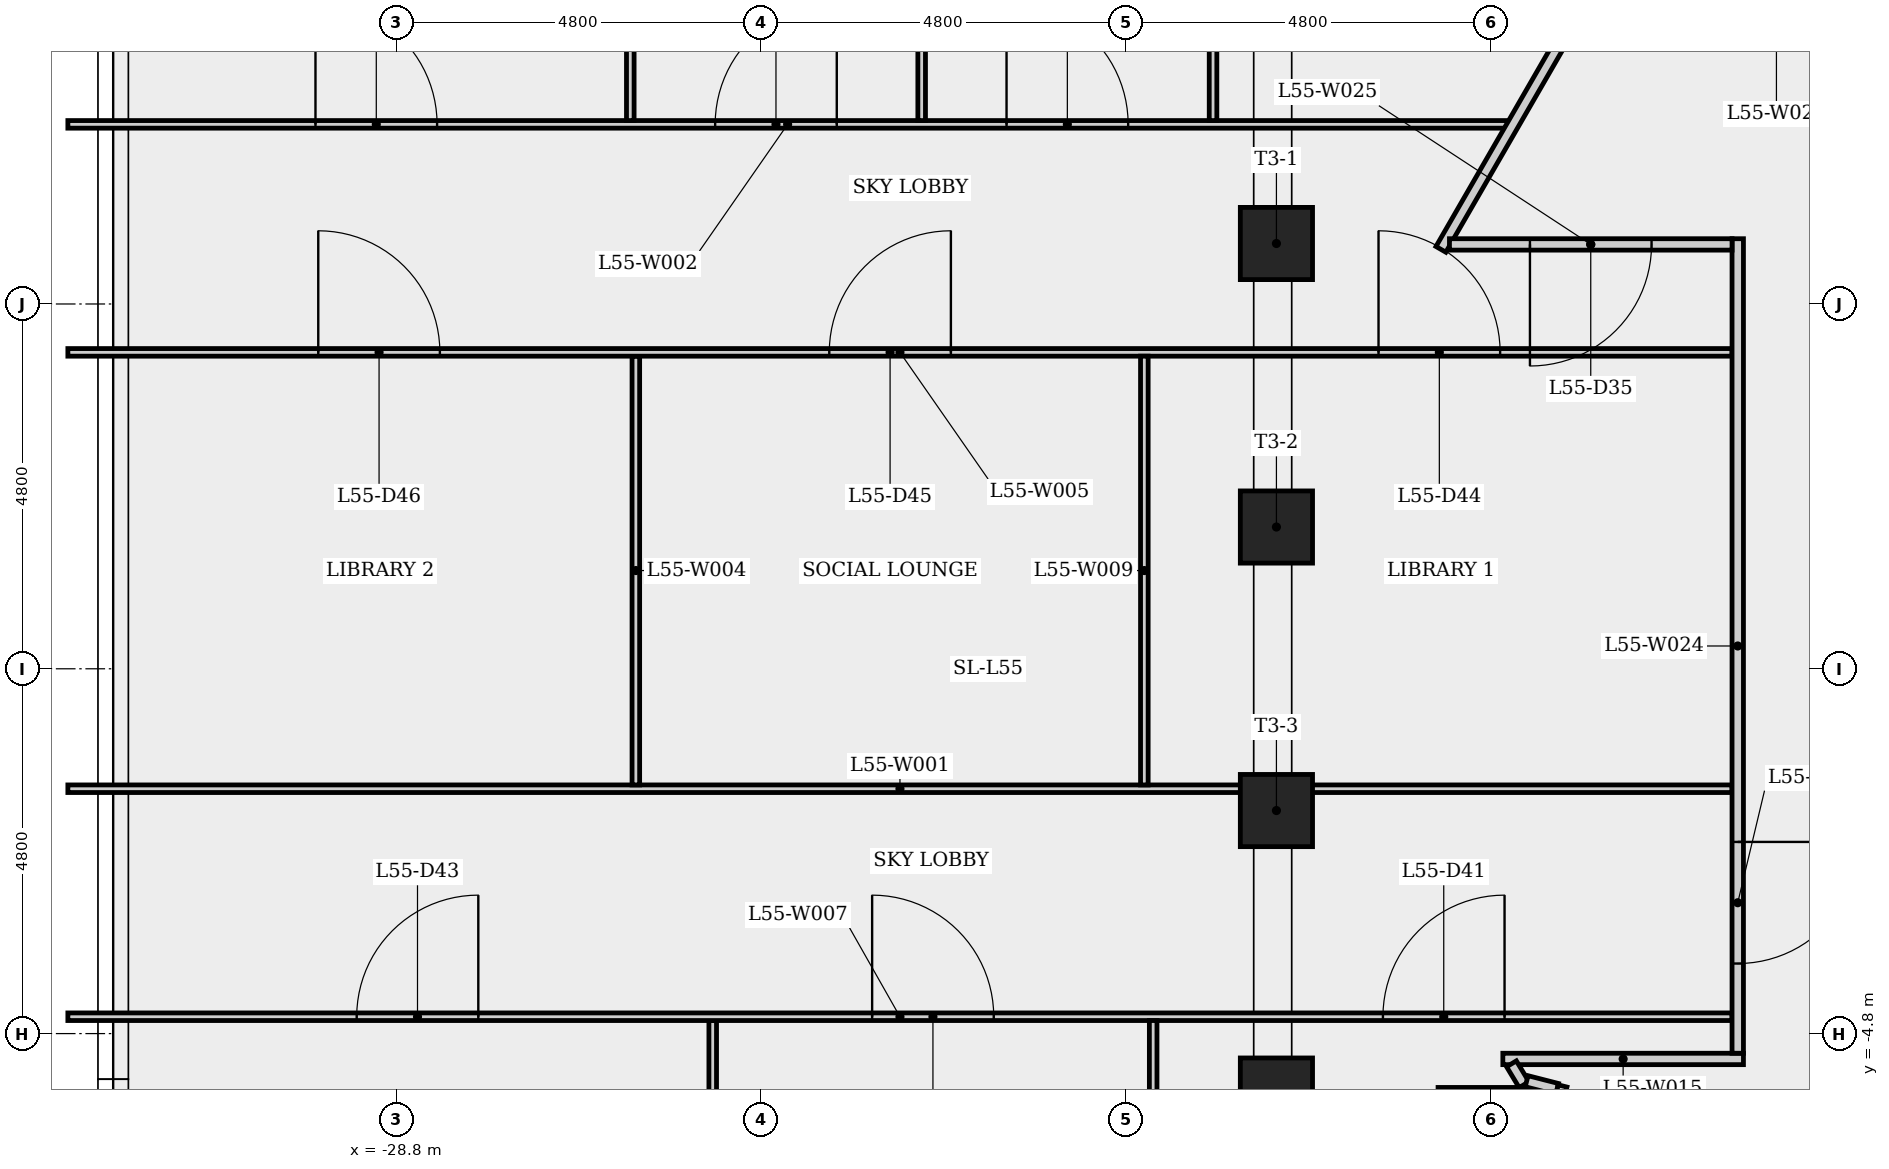
"""IFC4 building model, lengths in metres.
Left out: names, types, materials, properties, quantities, classifications, styles, units other than length and angle.
Written with IfcOpenShell. Run it as: python <this file> out.ifc"""

import sys

from ifc_helpers import new_model, si_unit, direction, frame, frame_2d, origin, origin_2d, place, context, subcontext, project, spatial, rectangle, extrude, element, fill, save


model = new_model("IFC4")
c1 = context("Model", 3, precision=1e-05, world=origin(), true_north=direction((0.0, 1.0)))
c2 = subcontext(c1, "Body", "Model", "MODEL_VIEW")
j1 = project(units=[si_unit("LENGTHUNIT", "METRE"), si_unit("PLANEANGLEUNIT", "RADIAN")], contexts=[c1])
p1 = place(None, origin())
s1 = spatial("IfcSite", under=j1, at=p1, CompositionType="ELEMENT")
p2 = place(p1, origin())
s2 = spatial("IfcBuilding", under=s1, at=p2, CompositionType="ELEMENT")
p3 = place(p2, frame((0.0, 0.0, 206.1)))
s3 = spatial("IfcBuildingStorey", under=s2, at=p3, CompositionType="ELEMENT", Elevation=206.1)
for number, where, z_axis, x_axis in (
    (1, (-17.219, 5.596, 0.0), (0.0, 0.0, 1.0), (-1.0, 0.0, 0.0)),
    (2, (-17.219, 1.865, 0.0), (0.0, 0.0, 1.0), (-1.0, 0.0, 0.0)),
    (3, (-17.219, -1.865, 0.0), (0.0, 0.0, 1.0), (-1.0, 0.0, 0.0)),
    (4, (-17.219, -5.596, 0.0), (0.0, 0.0, 1.0), (-1.0, 0.0, 0.0)),
):
    element("IfcColumn", number, at=place(p3, frame(where, z_axis=z_axis, x_axis=x_axis)), inside=s3, PredefinedType="COLUMN", context=c2, shape_type="SweptSolid", body=[
        extrude(rectangle(XDim=0.95, YDim=0.95, at=origin_2d()), origin(), (0.0, 0.0, 1.0), 4.0),
    ])
p4 = place(p3, frame((-33.12, -1.578, 0.0), z_axis=(0.0, 0.0, 1.0), x_axis=(1.0, 0.0, 0.0)))
e5 = element("IfcWall", 5, at=p4, inside=s3, PredefinedType="PARTITIONING", context=c2, shape_type="SweptSolid", body=[
    extrude(rectangle(XDim=21.895, YDim=0.1, at=frame_2d((10.948, 0.0))), origin(), (0.0, 0.0, 1.0), 3.6),
])
p5 = place(p3, frame((-33.12, 7.163, 0.0), z_axis=(0.0, 0.0, 1.0), x_axis=(1.0, 0.0, 0.0)))
e6 = element("IfcWall", 6, at=p5, inside=s3, PredefinedType="PARTITIONING", context=c2, shape_type="SweptSolid", body=[
    extrude(rectangle(XDim=18.939, YDim=0.1, at=frame_2d((9.47, 0.0))), origin(), (0.0, 0.0, 1.0), 3.6),
])
p6 = place(p5, frame((12.35, 0.0, 0.0)))
e7 = element("IfcOpeningElement", 7, at=p6, cuts=e6, PredefinedType="OPENING", context=c2, shape_type="SweptSolid", body=[
    extrude(rectangle(XDim=1.6, YDim=2.1, at=frame_2d((0.8, 1.05))), frame((0.0, 0.06, 0.0), z_axis=(0.0, -1.0, 0.0), x_axis=(1.0, 0.0, 0.0)), (0.0, 0.0, 1.0), 0.12),
])
p7 = place(p5, frame((8.516, 0.0, 0.0)))
e8 = element("IfcOpeningElement", 8, at=p7, cuts=e6, PredefinedType="OPENING", context=c2, shape_type="SweptSolid", body=[
    extrude(rectangle(XDim=1.6, YDim=2.1, at=frame_2d((0.8, 1.05))), frame((0.0, 0.06, 0.0), z_axis=(0.0, -1.0, 0.0), x_axis=(1.0, 0.0, 0.0)), (0.0, 0.0, 1.0), 0.12),
])
p8 = place(p5, frame((3.258, 0.0, 0.0)))
e9 = element("IfcOpeningElement", 9, at=p8, cuts=e6, PredefinedType="OPENING", context=c2, shape_type="SweptSolid", body=[
    extrude(rectangle(XDim=1.6, YDim=2.1, at=frame_2d((0.8, 1.05))), frame((0.0, 0.06, 0.0), z_axis=(0.0, -1.0, 0.0), x_axis=(1.0, 0.0, 0.0)), (0.0, 0.0, 1.0), 0.12),
])
p9 = place(p3, frame((-25.721, 7.213, 0.0), z_axis=(0.0, 0.0, 1.0), x_axis=(0.0, 1.0, 0.0)))
e10 = element("IfcWall", 10, at=p9, inside=s3, PredefinedType="PARTITIONING", context=c2, shape_type="SweptSolid", body=[
    extrude(rectangle(XDim=14.483, YDim=0.1, at=frame_2d((7.241, 0.0))), origin(), (0.0, 0.0, 1.0), 3.6),
])
p10 = place(p3, frame((-25.647, -1.528, 0.0), z_axis=(0.0, 0.0, 1.0), x_axis=(0.0, 1.0, 0.0)))
e11 = element("IfcWall", 11, at=p10, inside=s3, PredefinedType="PARTITIONING", context=c2, shape_type="SweptSolid", body=[
    extrude(rectangle(XDim=5.642, YDim=0.1, at=frame_2d((2.821, 0.0))), origin(), (0.0, 0.0, 1.0), 3.6),
])
p11 = place(p3, frame((-33.12, 4.163, 0.0), z_axis=(0.0, 0.0, 1.0), x_axis=(1.0, 0.0, 0.0)))
e12 = element("IfcWall", 12, at=p11, inside=s3, PredefinedType="PARTITIONING", context=c2, shape_type="SweptSolid", body=[
    extrude(rectangle(XDim=21.895, YDim=0.1, at=frame_2d((10.948, 0.0))), origin(), (0.0, 0.0, 1.0), 3.6),
])
p12 = place(p11, frame((17.244, 0.0, 0.0)))
e13 = element("IfcOpeningElement", 13, at=p12, cuts=e12, PredefinedType="OPENING", context=c2, shape_type="SweptSolid", body=[
    extrude(rectangle(XDim=1.6, YDim=2.1, at=frame_2d((0.8, 1.05))), frame((0.0, 0.06, 0.0), z_axis=(0.0, -1.0, 0.0), x_axis=(1.0, 0.0, 0.0)), (0.0, 0.0, 1.0), 0.12),
])
p13 = place(p11, frame((10.018, 0.0, 0.0)))
e14 = element("IfcOpeningElement", 14, at=p13, cuts=e12, PredefinedType="OPENING", context=c2, shape_type="SweptSolid", body=[
    extrude(rectangle(XDim=1.6, YDim=2.1, at=frame_2d((0.8, 1.05))), frame((0.0, 0.06, 0.0), z_axis=(0.0, -1.0, 0.0), x_axis=(1.0, 0.0, 0.0)), (0.0, 0.0, 1.0), 0.12),
])
p14 = place(p11, frame((3.294, 0.0, 0.0)))
e15 = element("IfcOpeningElement", 15, at=p14, cuts=e12, PredefinedType="OPENING", context=c2, shape_type="SweptSolid", body=[
    extrude(rectangle(XDim=1.6, YDim=2.1, at=frame_2d((0.8, 1.05))), frame((0.0, 0.06, 0.0), z_axis=(0.0, -1.0, 0.0), x_axis=(1.0, 0.0, 0.0)), (0.0, 0.0, 1.0), 0.12),
])
p15 = place(p3, frame((-24.636, -17.496, 0.0), z_axis=(0.0, 0.0, 1.0), x_axis=(0.0, 1.0, 0.0)))
e16 = element("IfcWall", 16, at=p15, inside=s3, PredefinedType="PARTITIONING", context=c2, shape_type="SweptSolid", body=[
    extrude(rectangle(XDim=12.868, YDim=0.1, at=frame_2d((6.434, 0.0))), origin(), (0.0, 0.0, 1.0), 3.6),
])
p16 = place(p3, frame((-33.12, -4.578, 0.0), z_axis=(0.0, 0.0, 1.0), x_axis=(1.0, 0.0, 0.0)))
e17 = element("IfcWall", 17, at=p16, inside=s3, PredefinedType="PARTITIONING", context=c2, shape_type="SweptSolid", body=[
    extrude(rectangle(XDim=21.895, YDim=0.1, at=frame_2d((10.948, 0.0))), origin(), (0.0, 0.0, 1.0), 3.6),
])
p17 = place(p16, frame((17.302, 0.0, 0.0)))
e18 = element("IfcOpeningElement", 18, at=p17, cuts=e17, PredefinedType="OPENING", context=c2, shape_type="SweptSolid", body=[
    extrude(rectangle(XDim=1.6, YDim=2.1, at=frame_2d((0.8, 1.05))), frame((0.0, 0.06, 0.0), z_axis=(0.0, -1.0, 0.0), x_axis=(1.0, 0.0, 0.0)), (0.0, 0.0, 1.0), 0.12),
])
p18 = place(p16, frame((10.582, 0.0, 0.0)))
e19 = element("IfcOpeningElement", 19, at=p18, cuts=e17, PredefinedType="OPENING", context=c2, shape_type="SweptSolid", body=[
    extrude(rectangle(XDim=1.6, YDim=2.1, at=frame_2d((0.8, 1.05))), frame((0.0, 0.06, 0.0), z_axis=(0.0, -1.0, 0.0), x_axis=(1.0, 0.0, 0.0)), (0.0, 0.0, 1.0), 0.12),
])
p19 = place(p16, frame((3.8, 0.0, 0.0)))
e20 = element("IfcOpeningElement", 20, at=p19, cuts=e17, PredefinedType="OPENING", context=c2, shape_type="SweptSolid", body=[
    extrude(rectangle(XDim=1.6, YDim=2.1, at=frame_2d((0.8, 1.05))), frame((0.0, 0.06, 0.0), z_axis=(0.0, -1.0, 0.0), x_axis=(1.0, 0.0, 0.0)), (0.0, 0.0, 1.0), 0.12),
])
p20 = place(p3, frame((-21.887, 7.213, 0.0), z_axis=(0.0, 0.0, 1.0), x_axis=(0.0, 1.0, 0.0)))
e21 = element("IfcWall", 21, at=p20, inside=s3, PredefinedType="PARTITIONING", context=c2, shape_type="SweptSolid", body=[
    extrude(rectangle(XDim=14.483, YDim=0.1, at=frame_2d((7.241, 0.0))), origin(), (0.0, 0.0, 1.0), 3.6),
])
p21 = place(p3, frame((-18.957, -1.528, 0.0), z_axis=(0.0, 0.0, 1.0), x_axis=(0.0, 1.0, 0.0)))
e22 = element("IfcWall", 22, at=p21, inside=s3, PredefinedType="PARTITIONING", context=c2, shape_type="SweptSolid", body=[
    extrude(rectangle(XDim=5.642, YDim=0.1, at=frame_2d((2.821, 0.0))), origin(), (0.0, 0.0, 1.0), 3.6),
])
p22 = place(p3, frame((-18.841, -17.496, 0.0), z_axis=(0.0, 0.0, 1.0), x_axis=(0.0, 1.0, 0.0)))
e23 = element("IfcWall", 23, at=p22, inside=s3, PredefinedType="PARTITIONING", context=c2, shape_type="SweptSolid", body=[
    extrude(rectangle(XDim=12.868, YDim=0.1, at=frame_2d((6.434, 0.0))), origin(), (0.0, 0.0, 1.0), 3.6),
])
p23 = place(p3, frame((-18.053, 7.213, 0.0), z_axis=(0.0, 0.0, 1.0), x_axis=(0.0, 1.0, 0.0)))
e24 = element("IfcWall", 24, at=p23, inside=s3, PredefinedType="PARTITIONING", context=c2, shape_type="SweptSolid", body=[
    extrude(rectangle(XDim=14.483, YDim=0.1, at=frame_2d((7.241, 0.0))), origin(), (0.0, 0.0, 1.0), 3.6),
])
p24 = place(p3, frame((-15.055, 5.519, 0.0), z_axis=(0.0, 0.0, 1.0), x_axis=(0.499997192861, 0.866027024481, 0.0)))
e25 = element("IfcWall", 25, at=p24, inside=s3, PredefinedType="PARTITIONING", context=c2, shape_type="SweptSolid", body=[
    extrude(rectangle(XDim=6.615, YDim=0.15, at=frame_2d((3.308, 0.0))), origin(), (0.0, 0.0, 1.0), 3.6),
])
p25 = place(p24, frame((3.417, 0.0, 0.0)))
e26 = element("IfcOpeningElement", 26, at=p25, cuts=e25, PredefinedType="OPENING", context=c2, shape_type="SweptSolid", body=[
    extrude(rectangle(XDim=1.6, YDim=2.1, at=frame_2d((0.8, 1.05))), frame((0.0, 0.085, 0.0), z_axis=(0.0, -1.0, 0.0), x_axis=(1.0, 0.0, 0.0)), (0.0, 0.0, 1.0), 0.17),
])
p26 = place(p3, frame((-15.093, -5.584, 0.0), z_axis=(0.0, 0.0, 1.0), x_axis=(1.0, 0.0, 0.0)))
e27 = element("IfcWall", 27, at=p26, inside=s3, PredefinedType="PARTITIONING", context=c2, shape_type="SweptSolid", body=[
    extrude(rectangle(XDim=1.556, YDim=0.15, at=frame_2d((0.778, 0.0))), origin(), (0.0, 0.0, 1.0), 3.6),
])
p27 = place(p3, frame((-14.24, -5.134, 0.0), z_axis=(0.0, 0.0, 1.0), x_axis=(1.0, 0.0, 0.0)))
e28 = element("IfcWall", 28, at=p27, inside=s3, PredefinedType="PARTITIONING", context=c2, shape_type="SweptSolid", body=[
    extrude(rectangle(XDim=3.166, YDim=0.15, at=frame_2d((1.583, 0.0))), origin(), (0.0, 0.0, 1.0), 3.6),
])
p28 = place(p3, frame((-13.961, -5.472, 0.0), z_axis=(0.0, 0.0, 1.0), x_axis=(-0.51651090313, 0.856280612269, 0.0)))
e29 = element("IfcWall", 29, at=p28, inside=s3, PredefinedType="PARTITIONING", context=c2, shape_type="SweptSolid", body=[
    extrude(rectangle(XDim=0.321, YDim=0.15, at=frame_2d((0.16, 0.0))), origin(), (0.0, 0.0, 1.0), 3.6),
])
p29 = place(p3, frame((-13.527, -5.529, 0.0), z_axis=(0.0, 0.0, 1.0), x_axis=(-0.968736704431, 0.248091107232, 0.0)))
e30 = element("IfcWall", 30, at=p29, inside=s3, PredefinedType="PARTITIONING", context=c2, shape_type="SweptSolid", body=[
    extrude(rectangle(XDim=0.413, YDim=0.15, at=frame_2d((0.207, 0.0))), origin(), (0.0, 0.0, 1.0), 3.6),
])
p30 = place(p3, frame((-13.416, -5.576, 0.0), z_axis=(0.0, 0.0, 1.0), x_axis=(-0.968907106081, 0.247424776016, 0.0)))
e31 = element("IfcWall", 31, at=p30, inside=s3, PredefinedType="PARTITIONING", context=c2, shape_type="SweptSolid", body=[
    extrude(rectangle(XDim=0.117, YDim=0.15, at=frame_2d((0.059, 0.0))), origin(), (0.0, 0.0, 1.0), 3.6),
])
p31 = place(p3, frame((-11.748, 11.118, 0.0), z_axis=(0.0, 0.0, 1.0), x_axis=(0.499988172549, -0.866032232259, 0.0)))
e32 = element("IfcWall", 32, at=p31, inside=s3, PredefinedType="PARTITIONING", context=c2, shape_type="SweptSolid", body=[
    extrude(rectangle(XDim=4.427, YDim=0.15, at=frame_2d((2.214, 0.0))), origin(), (0.0, 0.0, 1.0), 3.6),
])
p32 = place(p31, frame((1.676, 0.0, 0.0)))
e33 = element("IfcOpeningElement", 33, at=p32, cuts=e32, PredefinedType="OPENING", context=c2, shape_type="SweptSolid", body=[
    extrude(rectangle(XDim=1.0, YDim=2.1, at=frame_2d((0.5, 1.05))), frame((0.0, 0.085, 0.0), z_axis=(0.0, -1.0, 0.0), x_axis=(1.0, 0.0, 0.0)), (0.0, 0.0, 1.0), 0.17),
])
p33 = place(p3, frame((-11.15, 5.659, 0.0), z_axis=(0.0, 0.0, 1.0), x_axis=(0.0, -1.0, 0.0)))
e34 = element("IfcWall", 34, at=p33, inside=s3, PredefinedType="PARTITIONING", context=c2, shape_type="SweptSolid", body=[
    extrude(rectangle(XDim=10.717, YDim=0.15, at=frame_2d((5.359, 0.0))), origin(), (0.0, 0.0, 1.0), 3.6),
])
p34 = place(p33, frame((7.937, 0.0, 0.0)))
e35 = element("IfcOpeningElement", 35, at=p34, cuts=e34, PredefinedType="OPENING", context=c2, shape_type="SweptSolid", body=[
    extrude(rectangle(XDim=1.6, YDim=2.1, at=frame_2d((0.8, 1.05))), frame((0.0, 0.085, 0.0), z_axis=(0.0, -1.0, 0.0), x_axis=(1.0, 0.0, 0.0)), (0.0, 0.0, 1.0), 0.17),
])
p35 = place(p3, frame((-11.225, 5.584, 0.0), z_axis=(0.0, 0.0, 1.0), x_axis=(-1.0, 0.0, 0.0)))
e36 = element("IfcWall", 36, at=p35, inside=s3, PredefinedType="PARTITIONING", context=c2, shape_type="SweptSolid", body=[
    extrude(rectangle(XDim=3.718, YDim=0.15, at=frame_2d((1.859, 0.0))), origin(), (0.0, 0.0, 1.0), 3.6),
])
p36 = place(p35, frame((1.059, 0.0, 0.0)))
e37 = element("IfcOpeningElement", 37, at=p36, cuts=e36, PredefinedType="OPENING", context=c2, shape_type="SweptSolid", body=[
    extrude(rectangle(XDim=1.6, YDim=2.1, at=frame_2d((0.8, 1.05))), frame((0.0, 0.085, 0.0), z_axis=(0.0, -1.0, 0.0), x_axis=(1.0, 0.0, 0.0)), (0.0, 0.0, 1.0), 0.17),
])
p37 = place(p36, origin())
e38 = element("IfcDoor", 38, at=p37, inside=s3, OperationType="SINGLE_SWING_RIGHT", PredefinedType="DOOR", context=c2, shape_type="SweptSolid", body=[
    extrude(rectangle(XDim=1.6, YDim=2.1, at=frame_2d((0.8, 1.05))), frame((0.0, 0.025, 0.0), z_axis=(0.0, -1.0, 0.0), x_axis=(1.0, 0.0, 0.0)), (0.0, 0.0, 1.0), 0.05),
])
fill(e37, e38)
p38 = place(p34, origin())
e39 = element("IfcDoor", 39, at=p38, inside=s3, OperationType="SINGLE_SWING_LEFT", PredefinedType="DOOR", context=c2, shape_type="SweptSolid", body=[
    extrude(rectangle(XDim=1.6, YDim=2.1, at=frame_2d((0.8, 1.05))), frame((0.0, 0.025, 0.0), z_axis=(0.0, -1.0, 0.0), x_axis=(1.0, 0.0, 0.0)), (0.0, 0.0, 1.0), 0.05),
])
fill(e35, e39)
p39 = place(p6, origin())
e40 = element("IfcDoor", 40, at=p39, inside=s3, OperationType="SINGLE_SWING_LEFT", PredefinedType="DOOR", context=c2, shape_type="SweptSolid", body=[
    extrude(rectangle(XDim=1.6, YDim=2.1, at=frame_2d((0.8, 1.05))), frame((0.0, 0.025, 0.0), z_axis=(0.0, -1.0, 0.0), x_axis=(1.0, 0.0, 0.0)), (0.0, 0.0, 1.0), 0.05),
])
fill(e7, e40)
p40 = place(p7, origin())
e41 = element("IfcDoor", 41, at=p40, inside=s3, OperationType="SINGLE_SWING_RIGHT", PredefinedType="DOOR", context=c2, shape_type="SweptSolid", body=[
    extrude(rectangle(XDim=1.6, YDim=2.1, at=frame_2d((0.8, 1.05))), frame((0.0, 0.025, 0.0), z_axis=(0.0, -1.0, 0.0), x_axis=(1.0, 0.0, 0.0)), (0.0, 0.0, 1.0), 0.05),
])
fill(e8, e41)
p41 = place(p8, origin())
e42 = element("IfcDoor", 42, at=p41, inside=s3, OperationType="SINGLE_SWING_LEFT", PredefinedType="DOOR", context=c2, shape_type="SweptSolid", body=[
    extrude(rectangle(XDim=1.6, YDim=2.1, at=frame_2d((0.8, 1.05))), frame((0.0, 0.025, 0.0), z_axis=(0.0, -1.0, 0.0), x_axis=(1.0, 0.0, 0.0)), (0.0, 0.0, 1.0), 0.05),
])
fill(e9, e42)
p42 = place(p17, origin())
e43 = element("IfcDoor", 43, at=p42, inside=s3, OperationType="SINGLE_SWING_RIGHT", PredefinedType="DOOR", context=c2, shape_type="SweptSolid", body=[
    extrude(rectangle(XDim=1.6, YDim=2.1, at=frame_2d((0.8, 1.05))), frame((0.0, 0.025, 0.0), z_axis=(0.0, -1.0, 0.0), x_axis=(1.0, 0.0, 0.0)), (0.0, 0.0, 1.0), 0.05),
])
fill(e18, e43)
p43 = place(p18, origin())
e44 = element("IfcDoor", 44, at=p43, inside=s3, OperationType="SINGLE_SWING_LEFT", PredefinedType="DOOR", context=c2, shape_type="SweptSolid", body=[
    extrude(rectangle(XDim=1.6, YDim=2.1, at=frame_2d((0.8, 1.05))), frame((0.0, 0.025, 0.0), z_axis=(0.0, -1.0, 0.0), x_axis=(1.0, 0.0, 0.0)), (0.0, 0.0, 1.0), 0.05),
])
fill(e19, e44)
p44 = place(p19, origin())
e45 = element("IfcDoor", 45, at=p44, inside=s3, OperationType="SINGLE_SWING_RIGHT", PredefinedType="DOOR", context=c2, shape_type="SweptSolid", body=[
    extrude(rectangle(XDim=1.6, YDim=2.1, at=frame_2d((0.8, 1.05))), frame((0.0, 0.025, 0.0), z_axis=(0.0, -1.0, 0.0), x_axis=(1.0, 0.0, 0.0)), (0.0, 0.0, 1.0), 0.05),
])
fill(e20, e45)
p45 = place(p12, origin())
e46 = element("IfcDoor", 46, at=p45, inside=s3, OperationType="SINGLE_SWING_LEFT", PredefinedType="DOOR", context=c2, shape_type="SweptSolid", body=[
    extrude(rectangle(XDim=1.6, YDim=2.1, at=frame_2d((0.8, 1.05))), frame((0.0, 0.025, 0.0), z_axis=(0.0, -1.0, 0.0), x_axis=(1.0, 0.0, 0.0)), (0.0, 0.0, 1.0), 0.05),
])
fill(e13, e46)
p46 = place(p13, origin())
e47 = element("IfcDoor", 47, at=p46, inside=s3, OperationType="SINGLE_SWING_RIGHT", PredefinedType="DOOR", context=c2, shape_type="SweptSolid", body=[
    extrude(rectangle(XDim=1.6, YDim=2.1, at=frame_2d((0.8, 1.05))), frame((0.0, 0.025, 0.0), z_axis=(0.0, -1.0, 0.0), x_axis=(1.0, 0.0, 0.0)), (0.0, 0.0, 1.0), 0.05),
])
fill(e14, e47)
p47 = place(p14, origin())
e48 = element("IfcDoor", 48, at=p47, inside=s3, OperationType="SINGLE_SWING_LEFT", PredefinedType="DOOR", context=c2, shape_type="SweptSolid", body=[
    extrude(rectangle(XDim=1.6, YDim=2.1, at=frame_2d((0.8, 1.05))), frame((0.0, 0.025, 0.0), z_axis=(0.0, -1.0, 0.0), x_axis=(1.0, 0.0, 0.0)), (0.0, 0.0, 1.0), 0.05),
])
fill(e15, e48)
save(model, sys.argv[1])
